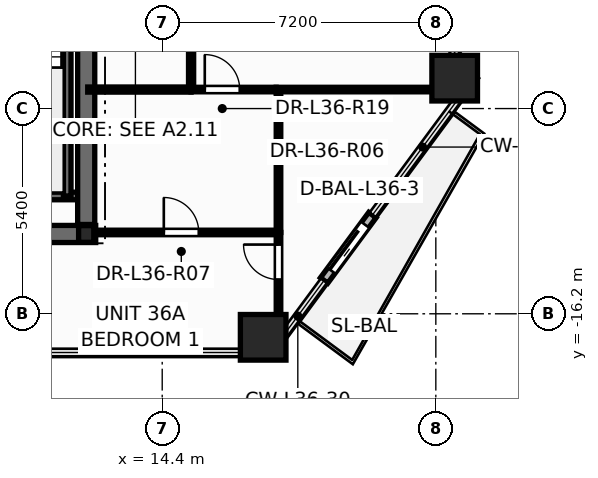
"""IFC4 building model, lengths in metres.
Left out: names, types, materials, properties, quantities, classifications, styles, units other than length and angle.
Written with IfcOpenShell. Run it as: python <this file> out.ifc"""

import sys

from ifc_helpers import new_model, si_unit, direction, frame, frame_2d, origin, origin_2d, place, context, subcontext, project, spatial, rectangle, hollow_rectangle, i_section, extrude, element, fill, save


model = new_model("IFC4")
c1 = context("Model", 3, precision=1e-05, world=origin(), true_north=direction((0.0, 1.0)))
c2 = subcontext(c1, "Body", "Model", "MODEL_VIEW")
j1 = project(units=[si_unit("LENGTHUNIT", "METRE"), si_unit("PLANEANGLEUNIT", "RADIAN")], contexts=[c1])
p1 = place(None, origin())
s1 = spatial("IfcSite", under=j1, at=p1, CompositionType="ELEMENT")
p2 = place(p1, origin())
s2 = spatial("IfcBuilding", under=s1, at=p2, CompositionType="ELEMENT")
p3 = place(p2, frame((0.0, 0.0, 140.1)))
s3 = spatial("IfcBuildingStorey", under=s2, at=p3, CompositionType="ELEMENT", Elevation=140.1)
for number, where, z_axis, x_axis in (
    (1, (17.057, -16.819, 0.0), (0.0, 0.0, 1.0), (1.0, 0.0, 0.0)),
    (2, (22.096, -10.0, 0.0), (0.0, 0.0, 1.0), (1.0, 0.0, 0.0)),
):
    element("IfcColumn", number, at=place(p3, frame(where, z_axis=z_axis, x_axis=x_axis)), inside=s3, PredefinedType="COLUMN", context=c2, shape_type="SweptSolid", body=[
        extrude(hollow_rectangle(XDim=1.2, YDim=1.2, WallThickness=0.055, at=origin_2d()), origin(), (0.0, 0.0, 1.0), 3.6),
    ])
p4 = place(p3, frame((12.4, -14.1, 0.0), z_axis=(0.0, 0.0, 1.0), x_axis=(1.0, 0.0, 0.0)))
e3 = element("IfcColumn", 3, at=p4, inside=s3, PredefinedType="COLUMN", context=c2, shape_type="SweptSolid", body=[
    extrude(i_section(OverallWidth=0.4, OverallDepth=0.44, WebThickness=0.028, FlangeThickness=0.04, at=origin_2d()), origin(), (0.0, 0.0, 1.0), 3.6),
])
p5 = place(p3, frame((18.66, -15.323, -0.015), z_axis=(0.0, 0.0, 1.0), x_axis=(0.594381437757, 0.804183254271, 0.0)))
e4 = element("IfcWall", 4, at=p5, inside=s3, PredefinedType="STANDARD", context=c2, shape_type="SweptSolid", body=[
    extrude(rectangle(XDim=2.14, YDim=0.24, at=frame_2d((1.07, 0.0))), origin(), (0.0, 0.0, 1.0), 2.807),
])
p6 = place(p5, frame((0.32, 0.0, 0.015)))
e5 = element("IfcOpeningElement", 5, at=p6, cuts=e4, PredefinedType="OPENING", context=c2, shape_type="SweptSolid", body=[
    extrude(rectangle(XDim=1.506, YDim=2.204, at=frame_2d((0.75, 1.102))), frame((0.0, 0.13, 0.0), z_axis=(0.0, -1.0, 0.0), x_axis=(1.0, 0.0, 0.0)), (0.0, 0.0, 1.0), 0.26),
])
p7 = place(p3, frame((-12.65, -14.1, 0.0), z_axis=(0.0, 0.0, 1.0), x_axis=(1.0, 0.0, 0.0)))
e6 = element("IfcWall", 6, at=p7, inside=s3, PredefinedType="SHEAR", context=c2, shape_type="SweptSolid", body=[
    extrude(rectangle(XDim=25.3, YDim=0.45, at=frame_2d((12.65, 0.0))), origin(), (0.0, 0.0, 1.0), 3.6),
])
p8 = place(p3, frame((8.48, -13.1, 0.0), z_axis=(0.0, 0.0, 1.0), x_axis=(1.0, 0.0, 0.0)))
e7 = element("IfcWall", 7, at=p8, inside=s3, PredefinedType="SOLIDWALL", context=c2, shape_type="SweptSolid", body=[
    extrude(rectangle(XDim=3.87, YDim=0.2, at=frame_2d((1.935, 0.0))), origin(), (0.0, 0.0, 1.0), 3.6),
])
p9 = place(p3, frame((11.9, -13.1, 0.0), z_axis=(0.0, 0.0, 1.0), x_axis=(0.0, 1.0, 0.0)))
e8 = element("IfcWall", 8, at=p9, inside=s3, PredefinedType="SOLIDWALL", context=c2, shape_type="SweptSolid", body=[
    extrude(rectangle(XDim=7.58, YDim=0.2, at=frame_2d((3.79, 0.0))), origin(), (0.0, 0.0, 1.0), 3.6),
])
p10 = place(p3, frame((12.4, -13.85, 0.0), z_axis=(0.0, 0.0, 1.0), x_axis=(0.0, 1.0, 0.0)))
e9 = element("IfcWall", 9, at=p10, inside=s3, PredefinedType="SHEAR", context=c2, shape_type="SweptSolid", body=[
    extrude(rectangle(XDim=9.4, YDim=0.45, at=frame_2d((4.7, 0.0))), origin(), (0.0, 0.0, 1.0), 3.6),
])
p11 = place(p3, frame((12.652, -14.06, 0.0), z_axis=(0.0, 0.0, 1.0), x_axis=(1.0, 0.0, 0.0)))
e10 = element("IfcWall", 10, at=p11, inside=s3, PredefinedType="PARTITIONING", context=c2, shape_type="SweptSolid", body=[
    extrude(rectangle(XDim=4.808, YDim=0.12, at=frame_2d((2.404, 0.0))), origin(), (0.0, 0.0, 1.0), 3.35),
])
p12 = place(p11, frame((1.79, 0.0, 0.0)))
e11 = element("IfcOpeningElement", 11, at=p12, cuts=e10, PredefinedType="OPENING", context=c2, shape_type="SweptSolid", body=[
    extrude(rectangle(XDim=0.926, YDim=2.104, at=frame_2d((0.46, 1.052))), frame((0.0, 0.07, 0.0), z_axis=(0.0, -1.0, 0.0), x_axis=(1.0, 0.0, 0.0)), (0.0, 0.0, 1.0), 0.14),
])
p13 = place(p3, frame((17.4, -10.3, 0.0), z_axis=(0.0, 0.0, 1.0), x_axis=(1.0, 0.0, 0.0)))
e12 = element("IfcWall", 12, at=p13, inside=s3, PredefinedType="PARTITIONING", context=c2, shape_type="SweptSolid", body=[
    extrude(rectangle(XDim=4.972, YDim=0.12, at=frame_2d((2.486, 0.0))), origin(), (0.0, 0.0, 1.0), 2.792),
])
p14 = place(p3, frame((17.46, -14.06, 0.0), z_axis=(0.0, 0.0, 1.0), x_axis=(0.0, 1.0, 0.0)))
e13 = element("IfcWall", 13, at=p14, inside=s3, PredefinedType="PARTITIONING", context=c2, shape_type="SweptSolid", body=[
    extrude(rectangle(XDim=3.76, YDim=0.12, at=frame_2d((1.88, 0.0))), origin(), (0.0, 0.0, 1.0), 3.35),
])
p15 = place(p3, frame((17.46, -16.946, 0.0), z_axis=(0.0, 0.0, 1.0), x_axis=(0.0, 1.0, 0.0)))
e14 = element("IfcWall", 14, at=p15, inside=s3, PredefinedType="PARTITIONING", context=c2, shape_type="SweptSolid", body=[
    extrude(rectangle(XDim=2.886, YDim=0.12, at=frame_2d((1.443, 0.0))), origin(), (0.0, 0.0, 1.0), 2.792),
])
p16 = place(p15, frame((1.648, 0.0, 0.0)))
e15 = element("IfcOpeningElement", 15, at=p16, cuts=e14, PredefinedType="OPENING", context=c2, shape_type="SweptSolid", body=[
    extrude(rectangle(XDim=0.926, YDim=2.104, at=frame_2d((0.46, 1.052))), frame((0.0, 0.07, 0.0), z_axis=(0.0, -1.0, 0.0), x_axis=(1.0, 0.0, 0.0)), (0.0, 0.0, 1.0), 0.14),
])
p17 = place(p3, frame((15.16, -10.3, 0.0), z_axis=(0.0, 0.0, 1.0), x_axis=(0.0, 1.0, 0.0)))
e16 = element("IfcWall", 16, at=p17, inside=s3, PredefinedType="PARTITIONING", context=c2, shape_type="SweptSolid", body=[
    extrude(rectangle(XDim=2.74, YDim=0.135, at=frame_2d((1.37, 0.0))), origin(), (0.0, 0.0, 1.0), 3.35),
])
p18 = place(p3, frame((12.44, -10.3, 0.0), z_axis=(0.0, 0.0, 1.0), x_axis=(1.0, 0.0, 0.0)))
e17 = element("IfcWall", 17, at=p18, inside=s3, PredefinedType="PARTITIONING", context=c2, shape_type="SweptSolid", body=[
    extrude(rectangle(XDim=2.72, YDim=0.135, at=frame_2d((1.36, 0.0))), origin(), (0.0, 0.0, 1.0), 2.792),
])
p19 = place(p3, frame((15.16, -10.3, 0.0), z_axis=(0.0, 0.0, 1.0), x_axis=(1.0, 0.0, 0.0)))
e18 = element("IfcWall", 18, at=p19, inside=s3, PredefinedType="PARTITIONING", context=c2, shape_type="SweptSolid", body=[
    extrude(rectangle(XDim=2.238, YDim=0.12, at=frame_2d((1.119, 0.0))), origin(), (0.0, 0.0, 1.0), 3.35),
])
p20 = place(p19, frame((0.36, 0.0, 0.0)))
e19 = element("IfcOpeningElement", 19, at=p20, cuts=e18, PredefinedType="OPENING", context=c2, shape_type="SweptSolid", body=[
    extrude(rectangle(XDim=0.926, YDim=2.104, at=frame_2d((0.46, 1.052))), frame((0.0, 0.07, 0.0), z_axis=(0.0, -1.0, 0.0), x_axis=(1.0, 0.0, 0.0)), (0.0, 0.0, 1.0), 0.14),
])
p21 = place(p6, origin())
e20 = element("IfcDoor", 20, at=p21, inside=s3, OperationType="SLIDING_TO_RIGHT", PredefinedType="DOOR", context=c2, shape_type="SweptSolid", body=[
    extrude(rectangle(XDim=1.5, YDim=2.2, at=frame_2d((0.75, 1.1))), frame((0.0, 0.025, 0.0), z_axis=(0.0, -1.0, 0.0), x_axis=(1.0, 0.0, 0.0)), (0.0, 0.0, 1.0), 0.05),
])
fill(e5, e20)
p22 = place(p16, origin())
e21 = element("IfcDoor", 21, at=p22, inside=s3, OperationType="SINGLE_SWING_RIGHT", PredefinedType="DOOR", context=c2, shape_type="SweptSolid", body=[
    extrude(rectangle(XDim=0.92, YDim=2.1, at=frame_2d((0.46, 1.05))), frame((0.0, 0.025, 0.0), z_axis=(0.0, -1.0, 0.0), x_axis=(1.0, 0.0, 0.0)), (0.0, 0.0, 1.0), 0.05),
])
fill(e15, e21)
p23 = place(p12, origin())
e22 = element("IfcDoor", 22, at=p23, inside=s3, OperationType="SINGLE_SWING_LEFT", PredefinedType="DOOR", context=c2, shape_type="SweptSolid", body=[
    extrude(rectangle(XDim=0.92, YDim=2.1, at=frame_2d((0.46, 1.05))), frame((0.0, 0.025, 0.0), z_axis=(0.0, -1.0, 0.0), x_axis=(1.0, 0.0, 0.0)), (0.0, 0.0, 1.0), 0.05),
])
fill(e11, e22)
p24 = place(p20, origin())
e23 = element("IfcDoor", 23, at=p24, inside=s3, OperationType="SINGLE_SWING_LEFT", PredefinedType="DOOR", context=c2, shape_type="SweptSolid", body=[
    extrude(rectangle(XDim=0.92, YDim=2.1, at=frame_2d((0.46, 1.05))), frame((0.0, 0.025, 0.0), z_axis=(0.0, -1.0, 0.0), x_axis=(1.0, 0.0, 0.0)), (0.0, 0.0, 1.0), 0.05),
])
fill(e19, e23)
save(model, sys.argv[1])
